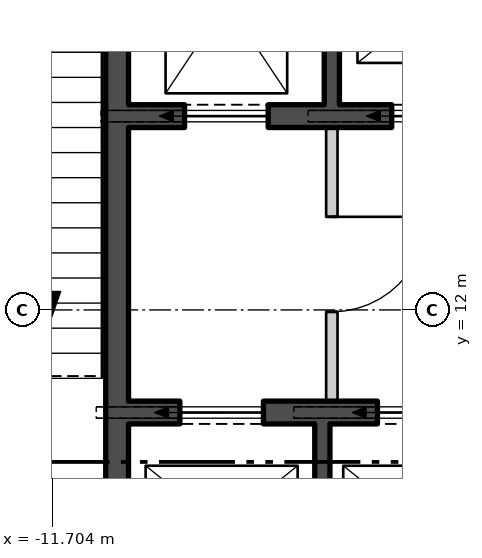
"""IFC4 building model, lengths in metres.
Left out: names, types, materials, properties, quantities, classifications, styles, units other than length and angle.
Written with IfcOpenShell. Run it as: python <this file> out.ifc"""

import sys

from ifc_helpers import new_model, si_unit, direction, frame, frame_2d, origin, place, context, subcontext, project, spatial, polyline, rectangle, outline, extrude, element, fill, save


model = new_model("IFC4")
c1 = context("Model", 3, precision=1e-05, world=origin(), true_north=direction((0.0, 1.0)))
c2 = subcontext(c1, "Body", "Model", "MODEL_VIEW")
j1 = project(units=[si_unit("LENGTHUNIT", "METRE"), si_unit("PLANEANGLEUNIT", "RADIAN")], contexts=[c1])
p1 = place(None, origin())
s1 = spatial("IfcSite", under=j1, at=p1, CompositionType="ELEMENT")
p2 = place(p1, origin())
s2 = spatial("IfcBuilding", under=s1, at=p2, CompositionType="ELEMENT")
p3 = place(p2, frame((0.0, 0.0, 60.3)))
s3 = spatial("IfcBuildingStorey", under=s2, at=p3, CompositionType="ELEMENT", Elevation=60.3)
p4 = place(p3, frame((-28.3, 10.579, -0.18), z_axis=(0.0, 0.0, 1.0), x_axis=(0.499999388847, -0.866025756634, 0.0)))
e1 = element("IfcWall", 1, at=p4, inside=s3, PredefinedType="SOLIDWALL", context=c2, shape_type="SweptSolid", body=[
    extrude(outline(polyline([(-0.13, -0.225), (45.88, -0.225), (45.62, 0.225), (0.13, 0.225), (-0.13, -0.225)])), origin(), (0.0, 0.0, 1.0), 4.28),
])
p5 = place(p4, frame((1.425, 0.0, 1.08)))
e2 = element("IfcOpeningElement", 2, at=p5, cuts=e1, PredefinedType="OPENING", context=c2, shape_type="SweptSolid", body=[
    extrude(rectangle(XDim=2.4, YDim=2.6, at=frame_2d((1.2, 1.3))), frame((0.0, 0.235, 0.0), z_axis=(0.0, -1.0, 0.0), x_axis=(1.0, 0.0, 0.0)), (0.0, 0.0, 1.0), 0.47),
])
p6 = place(p4, frame((5.895, 0.0, 1.08)))
e3 = element("IfcOpeningElement", 3, at=p6, cuts=e1, PredefinedType="OPENING", context=c2, shape_type="SweptSolid", body=[
    extrude(rectangle(XDim=2.4, YDim=2.6, at=frame_2d((1.2, 1.3))), frame((0.0, 0.235, 0.0), z_axis=(0.0, -1.0, 0.0), x_axis=(1.0, 0.0, 0.0)), (0.0, 0.0, 1.0), 0.47),
])
p7 = place(p4, frame((10.403, 0.0, 1.08)))
e4 = element("IfcOpeningElement", 4, at=p7, cuts=e1, PredefinedType="OPENING", context=c2, shape_type="SweptSolid", body=[
    extrude(rectangle(XDim=2.4, YDim=2.6, at=frame_2d((1.2, 1.3))), frame((0.0, 0.235, 0.0), z_axis=(0.0, -1.0, 0.0), x_axis=(1.0, 0.0, 0.0)), (0.0, 0.0, 1.0), 0.47),
])
p8 = place(p4, frame((14.912, 0.0, 1.08)))
e5 = element("IfcOpeningElement", 5, at=p8, cuts=e1, PredefinedType="OPENING", context=c2, shape_type="SweptSolid", body=[
    extrude(rectangle(XDim=2.4, YDim=2.6, at=frame_2d((1.2, 1.3))), frame((0.0, 0.235, 0.0), z_axis=(0.0, -1.0, 0.0), x_axis=(1.0, 0.0, 0.0)), (0.0, 0.0, 1.0), 0.47),
])
p9 = place(p4, frame((19.421, 0.0, 1.08)))
e6 = element("IfcOpeningElement", 6, at=p9, cuts=e1, PredefinedType="OPENING", context=c2, shape_type="SweptSolid", body=[
    extrude(rectangle(XDim=2.4, YDim=2.6, at=frame_2d((1.2, 1.3))), frame((0.0, 0.235, 0.0), z_axis=(0.0, -1.0, 0.0), x_axis=(1.0, 0.0, 0.0)), (0.0, 0.0, 1.0), 0.47),
])
p10 = place(p4, frame((23.929, 0.0, 1.08)))
e7 = element("IfcOpeningElement", 7, at=p10, cuts=e1, PredefinedType="OPENING", context=c2, shape_type="SweptSolid", body=[
    extrude(rectangle(XDim=2.4, YDim=2.6, at=frame_2d((1.2, 1.3))), frame((0.0, 0.235, 0.0), z_axis=(0.0, -1.0, 0.0), x_axis=(1.0, 0.0, 0.0)), (0.0, 0.0, 1.0), 0.47),
])
p11 = place(p4, frame((28.438, 0.0, 1.08)))
e8 = element("IfcOpeningElement", 8, at=p11, cuts=e1, PredefinedType="OPENING", context=c2, shape_type="SweptSolid", body=[
    extrude(rectangle(XDim=2.4, YDim=2.6, at=frame_2d((1.2, 1.3))), frame((0.0, 0.235, 0.0), z_axis=(0.0, -1.0, 0.0), x_axis=(1.0, 0.0, 0.0)), (0.0, 0.0, 1.0), 0.47),
])
p12 = place(p4, frame((32.947, 0.0, 1.08)))
e9 = element("IfcOpeningElement", 9, at=p12, cuts=e1, PredefinedType="OPENING", context=c2, shape_type="SweptSolid", body=[
    extrude(rectangle(XDim=2.4, YDim=2.6, at=frame_2d((1.2, 1.3))), frame((0.0, 0.235, 0.0), z_axis=(0.0, -1.0, 0.0), x_axis=(1.0, 0.0, 0.0)), (0.0, 0.0, 1.0), 0.47),
])
p13 = place(p4, frame((37.455, 0.0, 1.08)))
e10 = element("IfcOpeningElement", 10, at=p13, cuts=e1, PredefinedType="OPENING", context=c2, shape_type="SweptSolid", body=[
    extrude(rectangle(XDim=2.4, YDim=2.6, at=frame_2d((1.2, 1.3))), frame((0.0, 0.235, 0.0), z_axis=(0.0, -1.0, 0.0), x_axis=(1.0, 0.0, 0.0)), (0.0, 0.0, 1.0), 0.47),
])
p14 = place(p4, frame((41.925, 0.0, 1.08)))
e11 = element("IfcOpeningElement", 11, at=p14, cuts=e1, PredefinedType="OPENING", context=c2, shape_type="SweptSolid", body=[
    extrude(rectangle(XDim=2.4, YDim=2.6, at=frame_2d((1.2, 1.3))), frame((0.0, 0.235, 0.0), z_axis=(0.0, -1.0, 0.0), x_axis=(1.0, 0.0, 0.0)), (0.0, 0.0, 1.0), 0.47),
])
p15 = place(p3, frame((-10.85, 0.6, 0.0), z_axis=(0.0, 0.0, 1.0), x_axis=(0.0, 1.0, 0.0)))
e12 = element("IfcWall", 12, at=p15, inside=s3, PredefinedType="SHEAR", context=c2, shape_type="SweptSolid", body=[
    extrude(rectangle(XDim=16.8, YDim=0.3, at=frame_2d((8.4, 0.0))), origin(), (0.0, 0.0, 1.0), 4.3),
])
p16 = place(p15, frame((5.075, 0.0, 0.0)))
e13 = element("IfcOpeningElement", 13, at=p16, cuts=e12, PredefinedType="OPENING", context=c2, shape_type="SweptSolid", body=[
    extrude(rectangle(XDim=1.25, YDim=2.1, at=frame_2d((0.625, 1.05))), frame((0.0, 0.16, 0.0), z_axis=(0.0, -1.0, 0.0), x_axis=(1.0, 0.0, 0.0)), (0.0, 0.0, 1.0), 0.32),
])
p17 = place(p15, frame((1.525, 0.0, 0.0)))
e14 = element("IfcOpeningElement", 14, at=p17, cuts=e12, PredefinedType="OPENING", context=c2, shape_type="SweptSolid", body=[
    extrude(rectangle(XDim=1.0, YDim=2.1, at=frame_2d((0.5, 1.05))), frame((0.0, 0.16, 0.0), z_axis=(0.0, -1.0, 0.0), x_axis=(1.0, 0.0, 0.0)), (0.0, 0.0, 1.0), 0.32),
])
p18 = place(p3, frame((-10.7, 14.55, 0.0), z_axis=(0.0, 0.0, 1.0), x_axis=(1.0, 0.0, 0.0)))
e15 = element("IfcWall", 15, at=p18, inside=s3, PredefinedType="SHEAR", context=c2, shape_type="SweptSolid", body=[
    extrude(rectangle(XDim=21.4, YDim=0.3, at=frame_2d((10.7, 0.0))), origin(), (0.0, 0.0, 1.0), 4.3),
])
p19 = place(p18, frame((0.738, 0.0, 0.0)))
e16 = element("IfcOpeningElement", 16, at=p19, cuts=e15, PredefinedType="OPENING", context=c2, shape_type="SweptSolid", body=[
    extrude(rectangle(XDim=1.1, YDim=2.1, at=frame_2d((0.55, 1.05))), frame((0.0, 0.16, 0.0), z_axis=(0.0, -1.0, 0.0), x_axis=(1.0, 0.0, 0.0)), (0.0, 0.0, 1.0), 0.32),
])
p20 = place(p18, frame((3.462, 0.0, 0.0)))
e17 = element("IfcOpeningElement", 17, at=p20, cuts=e15, PredefinedType="OPENING", context=c2, shape_type="SweptSolid", body=[
    extrude(rectangle(XDim=1.1, YDim=2.1, at=frame_2d((0.55, 1.05))), frame((0.0, 0.16, 0.0), z_axis=(0.0, -1.0, 0.0), x_axis=(1.0, 0.0, 0.0)), (0.0, 0.0, 1.0), 0.32),
])
p21 = place(p18, frame((6.138, 0.0, 0.0)))
e18 = element("IfcOpeningElement", 18, at=p21, cuts=e15, PredefinedType="OPENING", context=c2, shape_type="SweptSolid", body=[
    extrude(rectangle(XDim=1.1, YDim=2.1, at=frame_2d((0.55, 1.05))), frame((0.0, 0.16, 0.0), z_axis=(0.0, -1.0, 0.0), x_axis=(1.0, 0.0, 0.0)), (0.0, 0.0, 1.0), 0.32),
])
p22 = place(p18, frame((8.812, 0.0, 0.0)))
e19 = element("IfcOpeningElement", 19, at=p22, cuts=e15, PredefinedType="OPENING", context=c2, shape_type="SweptSolid", body=[
    extrude(rectangle(XDim=1.1, YDim=2.1, at=frame_2d((0.55, 1.05))), frame((0.0, 0.16, 0.0), z_axis=(0.0, -1.0, 0.0), x_axis=(1.0, 0.0, 0.0)), (0.0, 0.0, 1.0), 0.32),
])
p23 = place(p18, frame((14.162, 0.0, 0.0)))
e20 = element("IfcOpeningElement", 20, at=p23, cuts=e15, PredefinedType="OPENING", context=c2, shape_type="SweptSolid", body=[
    extrude(rectangle(XDim=1.1, YDim=2.1, at=frame_2d((0.55, 1.05))), frame((0.0, 0.16, 0.0), z_axis=(0.0, -1.0, 0.0), x_axis=(1.0, 0.0, 0.0)), (0.0, 0.0, 1.0), 0.32),
])
p24 = place(p18, frame((16.837, 0.0, 0.0)))
e21 = element("IfcOpeningElement", 21, at=p24, cuts=e15, PredefinedType="OPENING", context=c2, shape_type="SweptSolid", body=[
    extrude(rectangle(XDim=1.1, YDim=2.1, at=frame_2d((0.55, 1.05))), frame((0.0, 0.16, 0.0), z_axis=(0.0, -1.0, 0.0), x_axis=(1.0, 0.0, 0.0)), (0.0, 0.0, 1.0), 0.32),
])
p25 = place(p18, frame((19.562, 0.0, 0.0)))
e22 = element("IfcOpeningElement", 22, at=p25, cuts=e15, PredefinedType="OPENING", context=c2, shape_type="SweptSolid", body=[
    extrude(rectangle(XDim=1.1, YDim=2.1, at=frame_2d((0.55, 1.05))), frame((0.0, 0.16, 0.0), z_axis=(0.0, -1.0, 0.0), x_axis=(1.0, 0.0, 0.0)), (0.0, 0.0, 1.0), 0.32),
])
p26 = place(p3, frame((-10.7, 10.65, 0.0), z_axis=(0.0, 0.0, 1.0), x_axis=(1.0, 0.0, 0.0)))
e23 = element("IfcWall", 23, at=p26, inside=s3, PredefinedType="SHEAR", context=c2, shape_type="SweptSolid", body=[
    extrude(rectangle(XDim=10.3, YDim=0.3, at=frame_2d((5.15, 0.0))), origin(), (0.0, 0.0, 1.0), 4.3),
])
p27 = place(p26, frame((0.675, 0.0, 0.0)))
e24 = element("IfcOpeningElement", 24, at=p27, cuts=e23, PredefinedType="OPENING", context=c2, shape_type="SweptSolid", body=[
    extrude(rectangle(XDim=1.1, YDim=2.1, at=frame_2d((0.55, 1.05))), frame((0.0, 0.16, 0.0), z_axis=(0.0, -1.0, 0.0), x_axis=(1.0, 0.0, 0.0)), (0.0, 0.0, 1.0), 0.32),
])
p28 = place(p26, frame((3.275, 0.0, 0.0)))
e25 = element("IfcOpeningElement", 25, at=p28, cuts=e23, PredefinedType="OPENING", context=c2, shape_type="SweptSolid", body=[
    extrude(rectangle(XDim=1.1, YDim=2.1, at=frame_2d((0.55, 1.05))), frame((0.0, 0.16, 0.0), z_axis=(0.0, -1.0, 0.0), x_axis=(1.0, 0.0, 0.0)), (0.0, 0.0, 1.0), 0.32),
])
p29 = place(p26, frame((5.825, 0.0, 0.0)))
e26 = element("IfcOpeningElement", 26, at=p29, cuts=e23, PredefinedType="OPENING", context=c2, shape_type="SweptSolid", body=[
    extrude(rectangle(XDim=1.1, YDim=2.1, at=frame_2d((0.55, 1.05))), frame((0.0, 0.16, 0.0), z_axis=(0.0, -1.0, 0.0), x_axis=(1.0, 0.0, 0.0)), (0.0, 0.0, 1.0), 0.32),
])
p30 = place(p26, frame((8.375, 0.0, 0.0)))
e27 = element("IfcOpeningElement", 27, at=p30, cuts=e23, PredefinedType="OPENING", context=c2, shape_type="SweptSolid", body=[
    extrude(rectangle(XDim=1.1, YDim=2.1, at=frame_2d((0.55, 1.05))), frame((0.0, 0.16, 0.0), z_axis=(0.0, -1.0, 0.0), x_axis=(1.0, 0.0, 0.0)), (0.0, 0.0, 1.0), 0.32),
])
for number, where, z_axis, x_axis in (
    (28, (-8.025, 14.7, 0.0), (0.0, 0.0, 1.0), (0.0, 1.0, 0.0)),
    (29, (-8.15, 7.8, 0.0), (0.0, 0.0, 1.0), (0.0, 1.0, 0.0)),
):
    element("IfcWall", number, at=place(p3, frame(where, z_axis=z_axis, x_axis=x_axis)), inside=s3, PredefinedType="SHEAR", context=c2, shape_type="SweptSolid", body=[
        extrude(rectangle(XDim=2.7, YDim=0.2, at=frame_2d((1.35, 0.0))), origin(), (0.0, 0.0, 1.0), 4.3),
    ])
p31 = place(p3, frame((-8.025, 10.8, 0.0), z_axis=(0.0, 0.0, 1.0), x_axis=(0.0, 1.0, 0.0)))
e30 = element("IfcWall", 30, at=p31, inside=s3, PredefinedType="PARTITIONING", context=c2, shape_type="SweptSolid", body=[
    extrude(rectangle(XDim=3.6, YDim=0.15, at=frame_2d((1.8, 0.0))), origin(), (0.0, 0.0, 1.0), 4.3),
])
p32 = place(p31, frame((1.175, 0.0, 0.0)))
e31 = element("IfcOpeningElement", 31, at=p32, cuts=e30, PredefinedType="OPENING", context=c2, shape_type="SweptSolid", body=[
    extrude(rectangle(XDim=1.25, YDim=2.1, at=frame_2d((0.625, 1.05))), frame((0.0, 0.085, 0.0), z_axis=(0.0, -1.0, 0.0), x_axis=(1.0, 0.0, 0.0)), (0.0, 0.0, 1.0), 0.17),
])
p33 = place(p19, origin())
e32 = element("IfcDoor", 32, at=p33, inside=s3, OperationType="SLIDING_TO_LEFT", PredefinedType="DOOR", context=c2, shape_type="SweptSolid", body=[
    extrude(rectangle(XDim=1.1, YDim=2.1, at=frame_2d((0.55, 1.05))), frame((0.0, 0.025, 0.0), z_axis=(0.0, -1.0, 0.0), x_axis=(1.0, 0.0, 0.0)), (0.0, 0.0, 1.0), 0.05),
])
fill(e16, e32)
p34 = place(p20, origin())
e33 = element("IfcDoor", 33, at=p34, inside=s3, OperationType="SLIDING_TO_LEFT", PredefinedType="DOOR", context=c2, shape_type="SweptSolid", body=[
    extrude(rectangle(XDim=1.1, YDim=2.1, at=frame_2d((0.55, 1.05))), frame((0.0, 0.025, 0.0), z_axis=(0.0, -1.0, 0.0), x_axis=(1.0, 0.0, 0.0)), (0.0, 0.0, 1.0), 0.05),
])
fill(e17, e33)
p35 = place(p27, origin())
e34 = element("IfcDoor", 34, at=p35, inside=s3, OperationType="SLIDING_TO_LEFT", PredefinedType="DOOR", context=c2, shape_type="SweptSolid", body=[
    extrude(rectangle(XDim=1.1, YDim=2.1, at=frame_2d((0.55, 1.05))), frame((0.0, 0.025, 0.0), z_axis=(0.0, -1.0, 0.0), x_axis=(1.0, 0.0, 0.0)), (0.0, 0.0, 1.0), 0.05),
])
fill(e24, e34)
p36 = place(p28, origin())
e35 = element("IfcDoor", 35, at=p36, inside=s3, OperationType="SLIDING_TO_LEFT", PredefinedType="DOOR", context=c2, shape_type="SweptSolid", body=[
    extrude(rectangle(XDim=1.1, YDim=2.1, at=frame_2d((0.55, 1.05))), frame((0.0, 0.025, 0.0), z_axis=(0.0, -1.0, 0.0), x_axis=(1.0, 0.0, 0.0)), (0.0, 0.0, 1.0), 0.05),
])
fill(e25, e35)
p37 = place(p32, origin())
e36 = element("IfcDoor", 36, at=p37, inside=s3, OperationType="SINGLE_SWING_RIGHT", PredefinedType="DOOR", context=c2, shape_type="SweptSolid", body=[
    extrude(rectangle(XDim=1.25, YDim=2.1, at=frame_2d((0.625, 1.05))), frame((0.0, 0.025, 0.0), z_axis=(0.0, -1.0, 0.0), x_axis=(1.0, 0.0, 0.0)), (0.0, 0.0, 1.0), 0.05),
])
fill(e31, e36)
save(model, sys.argv[1])
